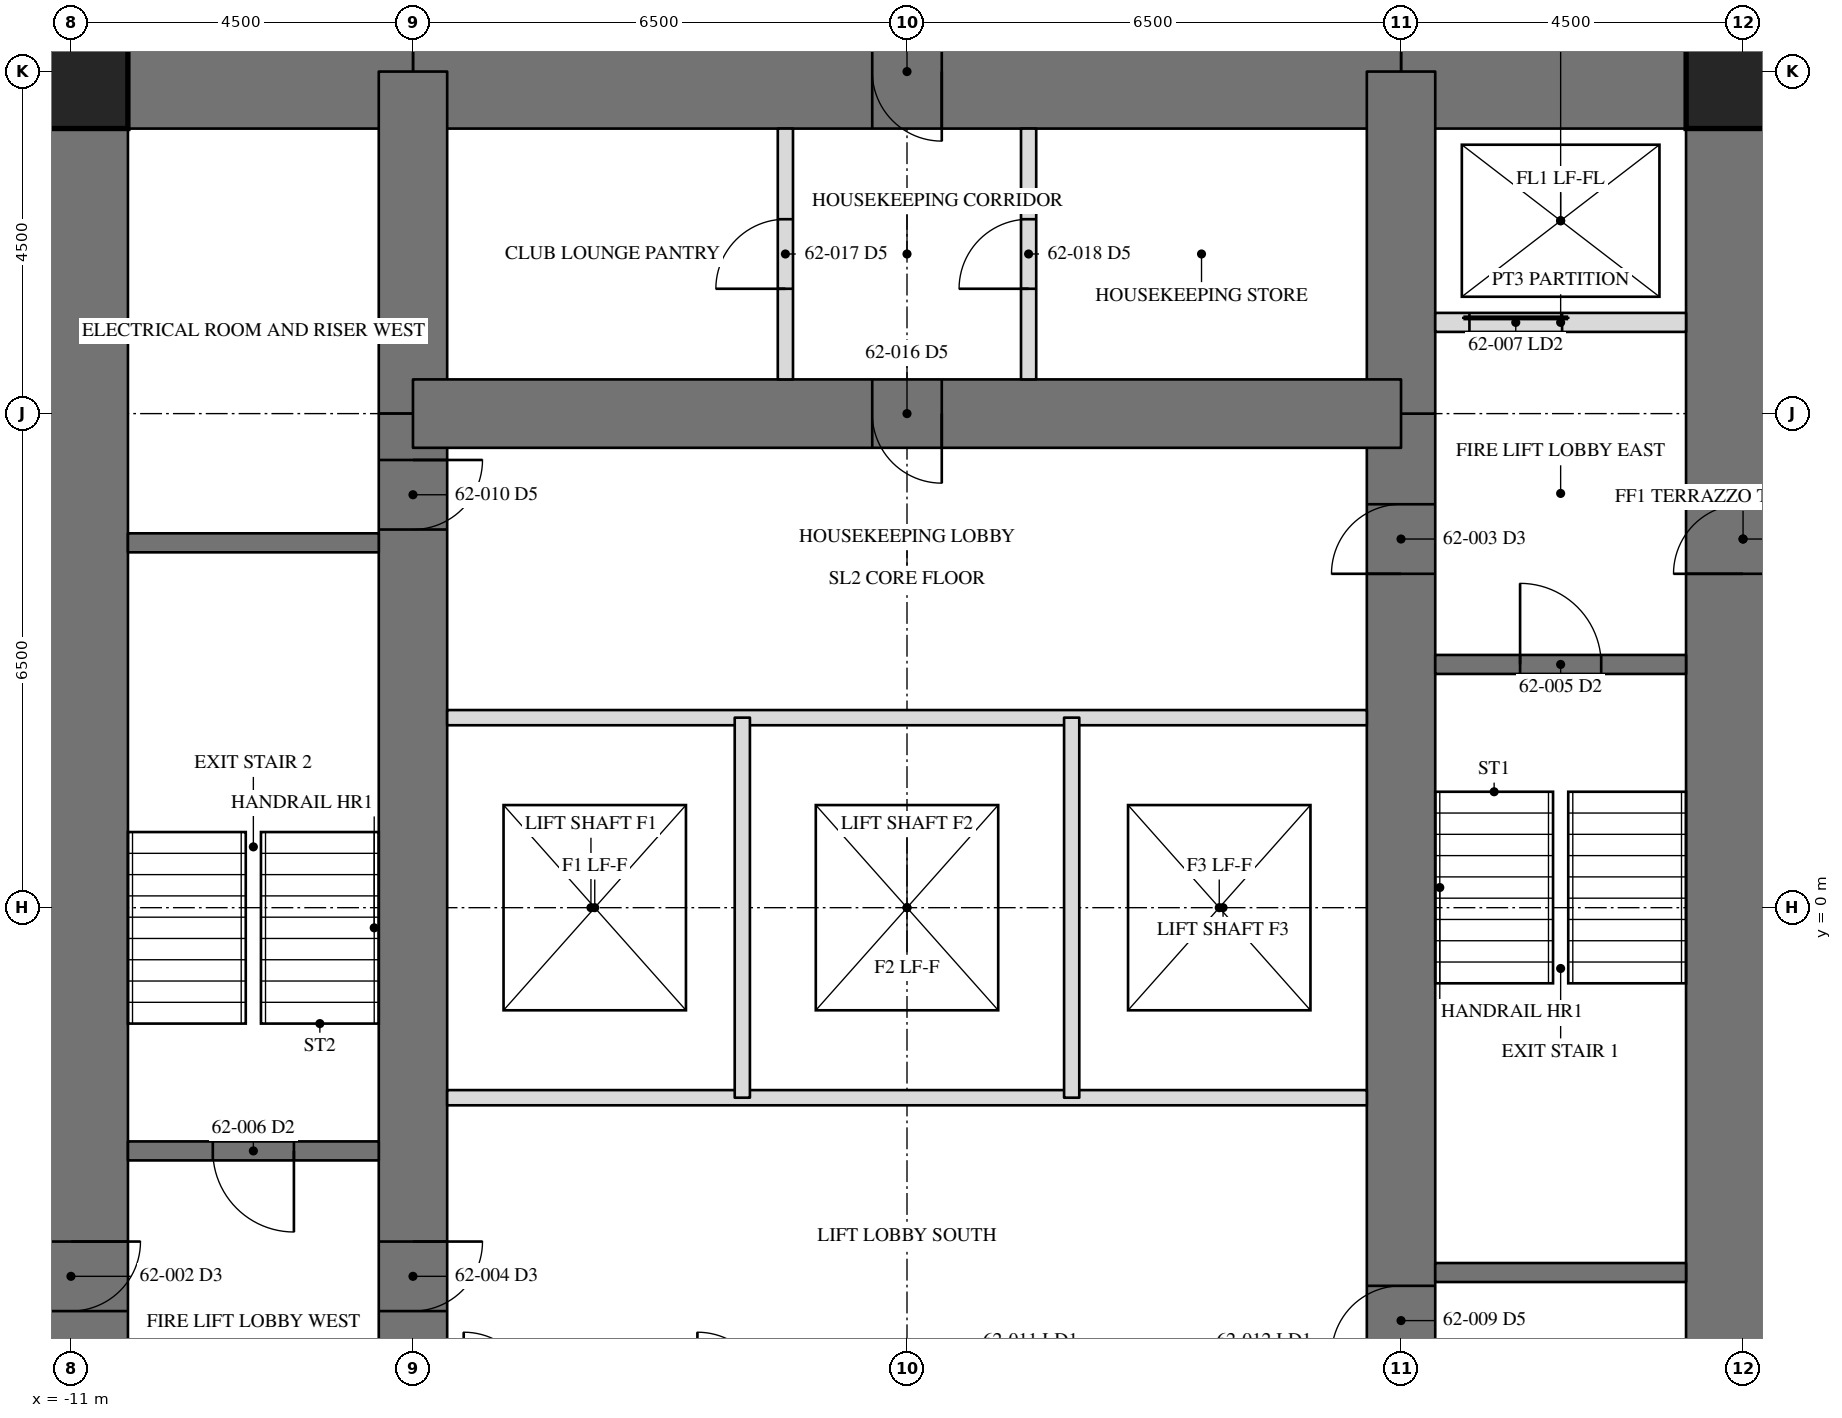
"""IFC4 building model, lengths in metres.
Left out: names, types, materials, properties, quantities, classifications, styles, units other than length and angle.
Written with IfcOpenShell. Run it as: python <this file> out.ifc"""

import sys

from ifc_helpers import new_model, si_unit, direction, frame, frame_2d, origin, origin_2d, place, context, subcontext, project, spatial, rectangle, hollow_rectangle, extrude, element, fill, save


model = new_model("IFC4")
c1 = context("Model", 3, precision=1e-05, world=origin(), true_north=direction((0.0, 1.0)))
c2 = subcontext(c1, "Body", "Model", "MODEL_VIEW")
j1 = project(units=[si_unit("LENGTHUNIT", "METRE"), si_unit("PLANEANGLEUNIT", "RADIAN")], contexts=[c1])
p1 = place(None, origin())
s1 = spatial("IfcSite", under=j1, at=p1, CompositionType="ELEMENT")
p2 = place(p1, origin())
s2 = spatial("IfcBuilding", under=s1, at=p2, CompositionType="ELEMENT")
p3 = place(p2, frame((0.0, 0.0, 253.7)))
s3 = spatial("IfcBuildingStorey", under=s2, at=p3, CompositionType="ELEMENT", Elevation=253.7)
p4 = place(p3, frame((11.0, -11.0, 0.0), z_axis=(0.0, 0.0, 1.0), x_axis=(0.0, 1.0, 0.0)))
e1 = element("IfcWall", 1, at=p4, inside=s3, PredefinedType="SHEAR", context=c2, shape_type="SweptSolid", body=[
    extrude(rectangle(XDim=22.0, YDim=1.5, at=frame_2d((11.0, 0.0))), origin(), (0.0, 0.0, 1.0), 3.5),
])
p5 = place(p4, frame((15.393, 0.0, 0.0)))
e2 = element("IfcOpeningElement", 2, at=p5, cuts=e1, PredefinedType="OPENING", context=c2, shape_type="SweptSolid", body=[
    extrude(rectangle(XDim=0.915, YDim=2.134, at=frame_2d((0.458, 1.067))), frame((0.0, 0.76, 0.0), z_axis=(0.0, -1.0, 0.0), x_axis=(1.0, 0.0, 0.0)), (0.0, 0.0, 1.0), 1.52),
])
p6 = place(p3, frame((-11.0, 11.0, 0.0), z_axis=(0.0, 0.0, 1.0), x_axis=(0.0, -1.0, 0.0)))
e3 = element("IfcWall", 3, at=p6, inside=s3, PredefinedType="SHEAR", context=c2, shape_type="SweptSolid", body=[
    extrude(rectangle(XDim=22.0, YDim=1.5, at=frame_2d((11.0, 0.0))), origin(), (0.0, 0.0, 1.0), 3.5),
])
p7 = place(p6, frame((15.393, 0.0, 0.0)))
e4 = element("IfcOpeningElement", 4, at=p7, cuts=e3, PredefinedType="OPENING", context=c2, shape_type="SweptSolid", body=[
    extrude(rectangle(XDim=0.915, YDim=2.134, at=frame_2d((0.458, 1.067))), frame((0.0, 0.76, 0.0), z_axis=(0.0, -1.0, 0.0), x_axis=(1.0, 0.0, 0.0)), (0.0, 0.0, 1.0), 1.52),
])
p8 = place(p3, frame((11.0, 11.0, 0.0), z_axis=(0.0, 0.0, 1.0), x_axis=(-1.0, 0.0, 0.0)))
e5 = element("IfcWall", 5, at=p8, inside=s3, PredefinedType="SHEAR", context=c2, shape_type="SweptSolid", body=[
    extrude(rectangle(XDim=4.5, YDim=1.5, at=frame_2d((2.25, 0.0))), origin(), (0.0, 0.0, 1.0), 3.5),
])
p9 = place(p3, frame((6.5, 11.0, 0.0), z_axis=(0.0, 0.0, 1.0), x_axis=(-1.0, 0.0, 0.0)))
e6 = element("IfcWall", 6, at=p9, inside=s3, PredefinedType="SHEAR", context=c2, shape_type="SweptSolid", body=[
    extrude(rectangle(XDim=13.0, YDim=1.5, at=frame_2d((6.5, 0.0))), origin(), (0.0, 0.0, 1.0), 3.5),
])
p10 = place(p9, frame((6.042, 0.0, 0.0)))
e7 = element("IfcOpeningElement", 7, at=p10, cuts=e6, PredefinedType="OPENING", context=c2, shape_type="SweptSolid", body=[
    extrude(rectangle(XDim=0.915, YDim=2.134, at=frame_2d((0.458, 1.067))), frame((0.0, 0.76, 0.0), z_axis=(0.0, -1.0, 0.0), x_axis=(1.0, 0.0, 0.0)), (0.0, 0.0, 1.0), 1.52),
])
p11 = place(p3, frame((-6.5, 11.0, 0.0), z_axis=(0.0, 0.0, 1.0), x_axis=(-1.0, 0.0, 0.0)))
e8 = element("IfcWall", 8, at=p11, inside=s3, PredefinedType="SHEAR", context=c2, shape_type="SweptSolid", body=[
    extrude(rectangle(XDim=4.5, YDim=1.5, at=frame_2d((2.25, 0.0))), origin(), (0.0, 0.0, 1.0), 3.5),
])
p12 = place(p3, frame((6.5, -6.5, 0.0), z_axis=(0.0, 0.0, 1.0), x_axis=(0.0, 1.0, 0.0)))
e9 = element("IfcWall", 9, at=p12, inside=s3, PredefinedType="SHEAR", context=c2, shape_type="SweptSolid", body=[
    extrude(rectangle(XDim=13.0, YDim=0.9, at=frame_2d((6.5, 0.0))), origin(), (0.0, 0.0, 1.0), 3.5),
])
p13 = place(p12, frame((10.893, 0.0, 0.0)))
e10 = element("IfcOpeningElement", 10, at=p13, cuts=e9, PredefinedType="OPENING", context=c2, shape_type="SweptSolid", body=[
    extrude(rectangle(XDim=0.915, YDim=2.134, at=frame_2d((0.458, 1.067))), frame((0.0, 0.46, 0.0), z_axis=(0.0, -1.0, 0.0), x_axis=(1.0, 0.0, 0.0)), (0.0, 0.0, 1.0), 0.92),
])
p14 = place(p12, frame((0.61, 0.0, 0.0)))
e11 = element("IfcOpeningElement", 11, at=p14, cuts=e9, PredefinedType="OPENING", context=c2, shape_type="SweptSolid", body=[
    extrude(rectangle(XDim=0.915, YDim=2.134, at=frame_2d((0.458, 1.067))), frame((0.0, 0.46, 0.0), z_axis=(0.0, -1.0, 0.0), x_axis=(1.0, 0.0, 0.0)), (0.0, 0.0, 1.0), 0.92),
])
for number, where, z_axis, x_axis in (
    (12, (6.5, 6.5, 0.0), (0.0, 0.0, 1.0), (0.0, 1.0, 0.0)),
    (13, (-6.5, 11.0, 0.0), (0.0, 0.0, 1.0), (0.0, -1.0, 0.0)),
):
    element("IfcWall", number, at=place(p3, frame(where, z_axis=z_axis, x_axis=x_axis)), inside=s3, PredefinedType="SHEAR", context=c2, shape_type="SweptSolid", body=[
        extrude(rectangle(XDim=4.5, YDim=0.9, at=frame_2d((2.25, 0.0))), origin(), (0.0, 0.0, 1.0), 3.5),
    ])
p15 = place(p3, frame((-6.5, 6.5, 0.0), z_axis=(0.0, 0.0, 1.0), x_axis=(0.0, -1.0, 0.0)))
e14 = element("IfcWall", 14, at=p15, inside=s3, PredefinedType="SHEAR", context=c2, shape_type="SweptSolid", body=[
    extrude(rectangle(XDim=13.0, YDim=0.9, at=frame_2d((6.5, 0.0))), origin(), (0.0, 0.0, 1.0), 3.5),
])
p16 = place(p15, frame((10.893, 0.0, 0.0)))
e15 = element("IfcOpeningElement", 15, at=p16, cuts=e14, PredefinedType="OPENING", context=c2, shape_type="SweptSolid", body=[
    extrude(rectangle(XDim=0.915, YDim=2.134, at=frame_2d((0.458, 1.067))), frame((0.0, 0.46, 0.0), z_axis=(0.0, -1.0, 0.0), x_axis=(1.0, 0.0, 0.0)), (0.0, 0.0, 1.0), 0.92),
])
p17 = place(p15, frame((0.61, 0.0, 0.0)))
e16 = element("IfcOpeningElement", 16, at=p17, cuts=e14, PredefinedType="OPENING", context=c2, shape_type="SweptSolid", body=[
    extrude(rectangle(XDim=0.915, YDim=2.134, at=frame_2d((0.458, 1.067))), frame((0.0, 0.46, 0.0), z_axis=(0.0, -1.0, 0.0), x_axis=(1.0, 0.0, 0.0)), (0.0, 0.0, 1.0), 0.92),
])
p18 = place(p3, frame((6.5, 6.5, 0.0), z_axis=(0.0, 0.0, 1.0), x_axis=(-1.0, 0.0, 0.0)))
e17 = element("IfcWall", 17, at=p18, inside=s3, PredefinedType="SHEAR", context=c2, shape_type="SweptSolid", body=[
    extrude(rectangle(XDim=13.0, YDim=0.9, at=frame_2d((6.5, 0.0))), origin(), (0.0, 0.0, 1.0), 3.5),
])
p19 = place(p18, frame((6.042, 0.0, 0.0)))
e18 = element("IfcOpeningElement", 18, at=p19, cuts=e17, PredefinedType="OPENING", context=c2, shape_type="SweptSolid", body=[
    extrude(rectangle(XDim=0.915, YDim=2.134, at=frame_2d((0.458, 1.067))), frame((0.0, 0.46, 0.0), z_axis=(0.0, -1.0, 0.0), x_axis=(1.0, 0.0, 0.0)), (0.0, 0.0, 1.0), 0.92),
])
for number, where, z_axis, x_axis in (
    (19, (11.0, 11.0, 0.0), (0.0, 0.0, 1.0), (1.0, 0.0, 0.0)),
    (20, (-11.0, 11.0, 0.0), (0.0, 0.0, 1.0), (1.0, 0.0, 0.0)),
):
    element("IfcColumn", number, at=place(p3, frame(where, z_axis=z_axis, x_axis=x_axis)), inside=s3, PredefinedType="COLUMN", context=c2, shape_type="SweptSolid", body=[
        extrude(hollow_rectangle(XDim=1.499, YDim=1.499, WallThickness=0.102, at=origin_2d()), origin(), (0.0, 0.0, 1.0), 3.5),
    ])
for number, where, z_axis, x_axis in (
    (21, (6.95, -4.8, 0.0), (0.0, 0.0, 1.0), (1.0, 0.0, 0.0)),
    (22, (-6.95, 4.8, 0.0), (0.0, 0.0, 1.0), (-1.0, 0.0, 0.0)),
):
    element("IfcWall", number, at=place(p3, frame(where, z_axis=z_axis, x_axis=x_axis)), inside=s3, PredefinedType="SOLIDWALL", context=c2, shape_type="SweptSolid", body=[
        extrude(rectangle(XDim=3.3, YDim=0.25, at=frame_2d((1.65, 0.0))), origin(), (0.0, 0.0, 1.0), 3.31),
    ])
p20 = place(p3, frame((6.95, 3.2, 0.0), z_axis=(0.0, 0.0, 1.0), x_axis=(1.0, 0.0, 0.0)))
e23 = element("IfcWall", 23, at=p20, inside=s3, PredefinedType="SOLIDWALL", context=c2, shape_type="SweptSolid", body=[
    extrude(rectangle(XDim=3.3, YDim=0.25, at=frame_2d((1.65, 0.0))), origin(), (0.0, 0.0, 1.0), 3.31),
])
p21 = place(p20, frame((1.116, 0.0, 0.0)))
e24 = element("IfcOpeningElement", 24, at=p21, cuts=e23, PredefinedType="OPENING", context=c2, shape_type="SweptSolid", body=[
    extrude(rectangle(XDim=1.067, YDim=2.134, at=frame_2d((0.533, 1.067))), frame((0.0, 0.135, 0.0), z_axis=(0.0, -1.0, 0.0), x_axis=(1.0, 0.0, 0.0)), (0.0, 0.0, 1.0), 0.27),
])
p22 = place(p3, frame((-6.95, -3.2, 0.0), z_axis=(0.0, 0.0, 1.0), x_axis=(-1.0, 0.0, 0.0)))
e25 = element("IfcWall", 25, at=p22, inside=s3, PredefinedType="SOLIDWALL", context=c2, shape_type="SweptSolid", body=[
    extrude(rectangle(XDim=3.3, YDim=0.25, at=frame_2d((1.65, 0.0))), origin(), (0.0, 0.0, 1.0), 3.31),
])
p23 = place(p22, frame((1.116, 0.0, 0.0)))
e26 = element("IfcOpeningElement", 26, at=p23, cuts=e25, PredefinedType="OPENING", context=c2, shape_type="SweptSolid", body=[
    extrude(rectangle(XDim=1.067, YDim=2.134, at=frame_2d((0.533, 1.067))), frame((0.0, 0.135, 0.0), z_axis=(0.0, -1.0, 0.0), x_axis=(1.0, 0.0, 0.0)), (0.0, 0.0, 1.0), 0.27),
])
p24 = place(p3, frame((6.95, 7.7, 0.0), z_axis=(0.0, 0.0, 1.0), x_axis=(1.0, 0.0, 0.0)))
e27 = element("IfcWall", 27, at=p24, inside=s3, PredefinedType="PARTITIONING", context=c2, shape_type="SweptSolid", body=[
    extrude(rectangle(XDim=3.3, YDim=0.25, at=frame_2d((1.65, 0.0))), origin(), (0.0, 0.0, 1.0), 3.31),
])
p25 = place(p24, frame((0.45, 0.0, 0.0)))
e28 = element("IfcOpeningElement", 28, at=p25, cuts=e27, PredefinedType="OPENING", context=c2, shape_type="SweptSolid", body=[
    extrude(rectangle(XDim=1.219, YDim=2.134, at=frame_2d((0.609, 1.067))), frame((0.0, 0.135, 0.0), z_axis=(0.0, -1.0, 0.0), x_axis=(1.0, 0.0, 0.0)), (0.0, 0.0, 1.0), 0.27),
])
for number, where, z_axis, x_axis in (
    (29, (-6.05, 2.5, 0.0), (0.0, 0.0, 1.0), (1.0, 0.0, 0.0)),
    (30, (6.05, -2.5, 0.0), (0.0, 0.0, 1.0), (-1.0, 0.0, 0.0)),
):
    element("IfcWall", number, at=place(p3, frame(where, z_axis=z_axis, x_axis=x_axis)), inside=s3, PredefinedType="PARTITIONING", context=c2, shape_type="SweptSolid", body=[
        extrude(rectangle(XDim=12.1, YDim=0.2, at=frame_2d((6.05, 0.0))), origin(), (0.0, 0.0, 1.0), 3.31),
    ])
for number, where, z_axis, x_axis in (
    (31, (-2.167, -2.5, 0.0), (0.0, 0.0, 1.0), (0.0, 1.0, 0.0)),
    (32, (2.167, -2.5, 0.0), (0.0, 0.0, 1.0), (0.0, 1.0, 0.0)),
):
    element("IfcWall", number, at=place(p3, frame(where, z_axis=z_axis, x_axis=x_axis)), inside=s3, PredefinedType="PARTITIONING", context=c2, shape_type="SweptSolid", body=[
        extrude(rectangle(XDim=5.0, YDim=0.2, at=frame_2d((2.5, 0.0))), origin(), (0.0, 0.0, 1.0), 3.31),
    ])
p26 = place(p3, frame((-1.6, 6.95, 0.0), z_axis=(0.0, 0.0, 1.0), x_axis=(0.0, 1.0, 0.0)))
e33 = element("IfcWall", 33, at=p26, inside=s3, PredefinedType="PARTITIONING", context=c2, shape_type="SweptSolid", body=[
    extrude(rectangle(XDim=3.3, YDim=0.2, at=frame_2d((1.65, 0.0))), origin(), (0.0, 0.0, 1.0), 3.31),
])
p27 = place(p26, frame((1.192, 0.0, 0.0)))
e34 = element("IfcOpeningElement", 34, at=p27, cuts=e33, PredefinedType="OPENING", context=c2, shape_type="SweptSolid", body=[
    extrude(rectangle(XDim=0.915, YDim=2.134, at=frame_2d((0.458, 1.067))), frame((0.0, 0.11, 0.0), z_axis=(0.0, -1.0, 0.0), x_axis=(1.0, 0.0, 0.0)), (0.0, 0.0, 1.0), 0.22),
])
p28 = place(p3, frame((1.6, 6.95, 0.0), z_axis=(0.0, 0.0, 1.0), x_axis=(0.0, 1.0, 0.0)))
e35 = element("IfcWall", 35, at=p28, inside=s3, PredefinedType="PARTITIONING", context=c2, shape_type="SweptSolid", body=[
    extrude(rectangle(XDim=3.3, YDim=0.2, at=frame_2d((1.65, 0.0))), origin(), (0.0, 0.0, 1.0), 3.31),
])
p29 = place(p28, frame((1.192, 0.0, 0.0)))
e36 = element("IfcOpeningElement", 36, at=p29, cuts=e35, PredefinedType="OPENING", context=c2, shape_type="SweptSolid", body=[
    extrude(rectangle(XDim=0.915, YDim=2.134, at=frame_2d((0.458, 1.067))), frame((0.0, 0.11, 0.0), z_axis=(0.0, -1.0, 0.0), x_axis=(1.0, 0.0, 0.0)), (0.0, 0.0, 1.0), 0.22),
])
p30 = place(p13, origin())
e37 = element("IfcDoor", 37, at=p30, inside=s3, OperationType="SINGLE_SWING_RIGHT", PredefinedType="DOOR", context=c2, shape_type="SweptSolid", body=[
    extrude(rectangle(XDim=0.915, YDim=2.134, at=frame_2d((0.458, 1.067))), frame((0.0, -0.375, 0.0), z_axis=(0.0, -1.0, 0.0), x_axis=(1.0, 0.0, 0.0)), (0.0, 0.0, 1.0), 0.05),
])
fill(e10, e37)
p31 = place(p16, origin())
e38 = element("IfcDoor", 38, at=p31, inside=s3, OperationType="SINGLE_SWING_RIGHT", PredefinedType="DOOR", context=c2, shape_type="SweptSolid", body=[
    extrude(rectangle(XDim=0.915, YDim=2.134, at=frame_2d((0.458, 1.067))), frame((0.0, -0.375, 0.0), z_axis=(0.0, -1.0, 0.0), x_axis=(1.0, 0.0, 0.0)), (0.0, 0.0, 1.0), 0.05),
])
fill(e15, e38)
p32 = place(p21, origin())
e39 = element("IfcDoor", 39, at=p32, inside=s3, OperationType="SINGLE_SWING_LEFT", PredefinedType="DOOR", context=c2, shape_type="SweptSolid", body=[
    extrude(rectangle(XDim=1.067, YDim=2.134, at=frame_2d((0.533, 1.067))), frame((0.0, 0.025, 0.0), z_axis=(0.0, -1.0, 0.0), x_axis=(1.0, 0.0, 0.0)), (0.0, 0.0, 1.0), 0.05),
])
fill(e24, e39)
p33 = place(p23, origin())
e40 = element("IfcDoor", 40, at=p33, inside=s3, OperationType="SINGLE_SWING_LEFT", PredefinedType="DOOR", context=c2, shape_type="SweptSolid", body=[
    extrude(rectangle(XDim=1.067, YDim=2.134, at=frame_2d((0.533, 1.067))), frame((0.0, 0.025, 0.0), z_axis=(0.0, -1.0, 0.0), x_axis=(1.0, 0.0, 0.0)), (0.0, 0.0, 1.0), 0.05),
])
fill(e26, e40)
p34 = place(p25, origin())
e41 = element("IfcDoor", 41, at=p34, inside=s3, OperationType="SLIDING_TO_LEFT", PredefinedType="DOOR", context=c2, shape_type="SweptSolid", body=[
    extrude(rectangle(XDim=1.219, YDim=2.134, at=frame_2d((0.609, 1.067))), frame((0.0, 0.025, 0.0), z_axis=(0.0, -1.0, 0.0), x_axis=(1.0, 0.0, 0.0)), (0.0, 0.0, 1.0), 0.05),
])
fill(e28, e41)
p35 = place(p14, origin())
e42 = element("IfcDoor", 42, at=p35, inside=s3, OperationType="SINGLE_SWING_RIGHT", PredefinedType="DOOR", context=c2, shape_type="SweptSolid", body=[
    extrude(rectangle(XDim=0.915, YDim=2.134, at=frame_2d((0.458, 1.067))), frame((0.0, -0.375, 0.0), z_axis=(0.0, -1.0, 0.0), x_axis=(1.0, 0.0, 0.0)), (0.0, 0.0, 1.0), 0.05),
])
fill(e11, e42)
p36 = place(p17, origin())
e43 = element("IfcDoor", 43, at=p36, inside=s3, OperationType="SINGLE_SWING_RIGHT", PredefinedType="DOOR", context=c2, shape_type="SweptSolid", body=[
    extrude(rectangle(XDim=0.915, YDim=2.134, at=frame_2d((0.458, 1.067))), frame((0.0, -0.375, 0.0), z_axis=(0.0, -1.0, 0.0), x_axis=(1.0, 0.0, 0.0)), (0.0, 0.0, 1.0), 0.05),
])
fill(e16, e43)
p37 = place(p10, origin())
e44 = element("IfcDoor", 44, at=p37, inside=s3, OperationType="SINGLE_SWING_RIGHT", PredefinedType="DOOR", context=c2, shape_type="SweptSolid", body=[
    extrude(rectangle(XDim=0.915, YDim=2.134, at=frame_2d((0.458, 1.067))), frame((0.0, 0.025, 0.0), z_axis=(0.0, -1.0, 0.0), x_axis=(1.0, 0.0, 0.0)), (0.0, 0.0, 1.0), 0.05),
])
fill(e7, e44)
p38 = place(p19, origin())
e45 = element("IfcDoor", 45, at=p38, inside=s3, OperationType="SINGLE_SWING_RIGHT", PredefinedType="DOOR", context=c2, shape_type="SweptSolid", body=[
    extrude(rectangle(XDim=0.915, YDim=2.134, at=frame_2d((0.458, 1.067))), frame((0.0, -0.375, 0.0), z_axis=(0.0, -1.0, 0.0), x_axis=(1.0, 0.0, 0.0)), (0.0, 0.0, 1.0), 0.05),
])
fill(e18, e45)
p39 = place(p27, origin())
e46 = element("IfcDoor", 46, at=p39, inside=s3, OperationType="SINGLE_SWING_RIGHT", PredefinedType="DOOR", context=c2, shape_type="SweptSolid", body=[
    extrude(rectangle(XDim=0.915, YDim=2.134, at=frame_2d((0.458, 1.067))), frame((0.0, 0.025, 0.0), z_axis=(0.0, -1.0, 0.0), x_axis=(1.0, 0.0, 0.0)), (0.0, 0.0, 1.0), 0.05),
])
fill(e34, e46)
p40 = place(p29, origin())
e47 = element("IfcDoor", 47, at=p40, inside=s3, OperationType="SINGLE_SWING_RIGHT", PredefinedType="DOOR", context=c2, shape_type="SweptSolid", body=[
    extrude(rectangle(XDim=0.915, YDim=2.134, at=frame_2d((0.458, 1.067))), frame((0.0, 0.025, 0.0), z_axis=(0.0, -1.0, 0.0), x_axis=(1.0, 0.0, 0.0)), (0.0, 0.0, 1.0), 0.05),
])
fill(e36, e47)
save(model, sys.argv[1])
